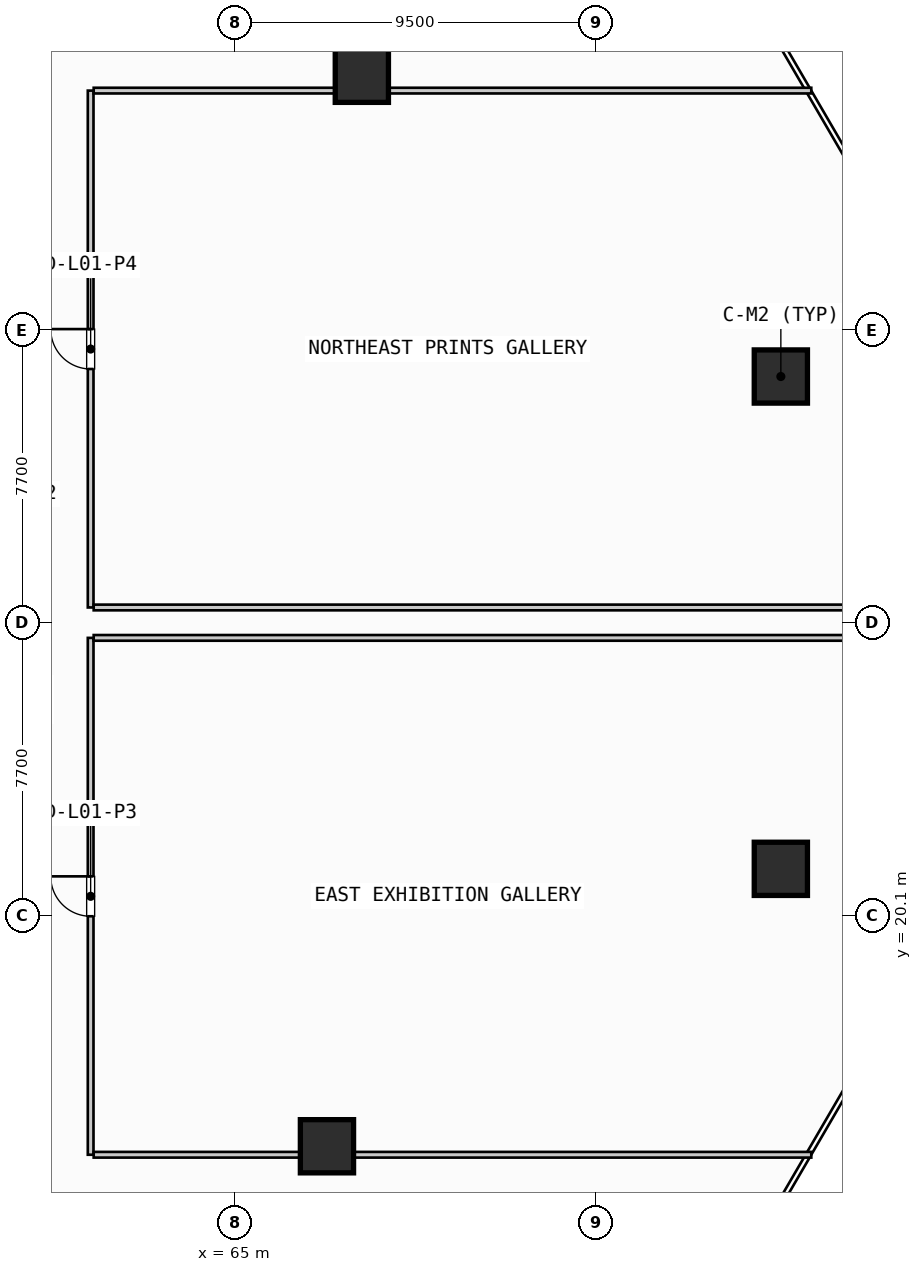
"""IFC4 building model, lengths in metres.
Left out: names, types, materials, properties, quantities, classifications, styles, units other than length and angle.
Written with IfcOpenShell. Run it as: python <this file> out.ifc"""

import sys

from ifc_helpers import new_model, si_unit, direction, frame, frame_2d, origin, origin_2d, place, context, subcontext, project, spatial, rectangle, hollow_rectangle, extrude, source, transform, mapped, element, fill, save


model = new_model("IFC4")
c1 = context("Model", 3, precision=1e-05, world=origin(), true_north=direction((0.0, 1.0)))
c2 = subcontext(c1, "Body", "Model", "MODEL_VIEW")
j1 = project(units=[si_unit("LENGTHUNIT", "METRE"), si_unit("PLANEANGLEUNIT", "RADIAN")], contexts=[c1])
p1 = place(None, origin())
s1 = spatial("IfcSite", under=j1, at=p1, CompositionType="ELEMENT")
p2 = place(p1, origin())
s2 = spatial("IfcBuilding", under=s1, at=p2, CompositionType="ELEMENT")
p3 = place(p2, frame((0.0, 0.0, 5.2)))
s3 = spatial("IfcBuildingStorey", under=s2, at=p3, CompositionType="ELEMENT", Elevation=5.2)
m1 = source(origin(), c2, "Body", "SweptSolid", [
    extrude(hollow_rectangle(XDim=1.4, YDim=1.4, WallThickness=0.05, InnerFilletRadius=0.025, OuterFilletRadius=0.075, at=origin_2d()), origin(), (0.0, 0.0, 1.0), 4.55),
])
for number, where, z_axis, x_axis in (
    (1, (79.362, 34.277, 0.0), (0.0, 0.0, 1.0), (1.0, 0.0, 0.0)),
    (2, (68.336, 42.19, 0.0), (0.0, 0.0, 1.0), (1.0, 0.0, 0.0)),
    (3, (67.418, 14.023, 0.0), (0.0, 0.0, 1.0), (1.0, 0.0, 0.0)),
    (4, (79.362, 21.323, 0.0), (0.0, 0.0, 1.0), (1.0, 0.0, 0.0)),
):
    element("IfcColumn", number, at=place(p3, frame(where, z_axis=z_axis, x_axis=x_axis)), inside=s3, PredefinedType="COLUMN", context=c2, shape_type="MappedRepresentation", body=[
        mapped(m1, transform((0.0, 0.0, 0.0), scale=1.0)),
    ])
p4 = place(p3, frame((61.2, 13.8, 0.0), z_axis=(0.0, 0.0, 1.0), x_axis=(0.0, 1.0, 0.0)))
e5 = element("IfcWall", 5, at=p4, inside=s3, PredefinedType="PARTITIONING", context=c2, shape_type="SweptSolid", body=[
    extrude(rectangle(XDim=13.6, YDim=0.15, at=frame_2d((6.8, 0.0))), origin(), (0.0, 0.0, 1.0), 3.763),
])
p5 = place(p4, frame((6.275, 0.0, 0.0)))
e6 = element("IfcOpeningElement", 6, at=p5, cuts=e5, PredefinedType="OPENING", context=c2, shape_type="SweptSolid", body=[
    extrude(rectangle(XDim=1.05, YDim=2.15, at=frame_2d((0.525, 1.075))), frame((0.0, 0.085, 0.0), z_axis=(0.0, -1.0, 0.0), x_axis=(1.0, 0.0, 0.0)), (0.0, 0.0, 1.0), 0.17),
])
p6 = place(p3, frame((61.28, 13.8, 0.0), z_axis=(0.0, 0.0, 1.0), x_axis=(1.0, 0.0, 0.0)))
e7 = element("IfcWall", 7, at=p6, inside=s3, PredefinedType="PARTITIONING", context=c2, shape_type="SweptSolid", body=[
    extrude(rectangle(XDim=18.883, YDim=0.15, at=frame_2d((9.441, 0.0))), origin(), (0.0, 0.0, 1.0), 3.763),
])
p7 = place(p3, frame((61.28, 27.4, 0.0), z_axis=(0.0, 0.0, 1.0), x_axis=(1.0, 0.0, 0.0)))
e8 = element("IfcWall", 8, at=p7, inside=s3, PredefinedType="PARTITIONING", context=c2, shape_type="SweptSolid", body=[
    extrude(rectangle(XDim=21.893, YDim=0.15, at=frame_2d((10.947, 0.0))), origin(), (0.0, 0.0, 1.0), 3.763),
])
p8 = place(p3, frame((61.2, 28.2, 0.0), z_axis=(0.0, 0.0, 1.0), x_axis=(0.0, 1.0, 0.0)))
e9 = element("IfcWall", 9, at=p8, inside=s3, PredefinedType="PARTITIONING", context=c2, shape_type="SweptSolid", body=[
    extrude(rectangle(XDim=13.6, YDim=0.15, at=frame_2d((6.8, 0.0))), origin(), (0.0, 0.0, 1.0), 3.763),
])
p9 = place(p8, frame((6.275, 0.0, 0.0)))
e10 = element("IfcOpeningElement", 10, at=p9, cuts=e9, PredefinedType="OPENING", context=c2, shape_type="SweptSolid", body=[
    extrude(rectangle(XDim=1.05, YDim=2.15, at=frame_2d((0.525, 1.075))), frame((0.0, 0.085, 0.0), z_axis=(0.0, -1.0, 0.0), x_axis=(1.0, 0.0, 0.0)), (0.0, 0.0, 1.0), 0.17),
])
p10 = place(p3, frame((61.28, 28.2, 0.0), z_axis=(0.0, 0.0, 1.0), x_axis=(1.0, 0.0, 0.0)))
e11 = element("IfcWall", 11, at=p10, inside=s3, PredefinedType="PARTITIONING", context=c2, shape_type="SweptSolid", body=[
    extrude(rectangle(XDim=21.893, YDim=0.15, at=frame_2d((10.947, 0.0))), origin(), (0.0, 0.0, 1.0), 3.763),
])
p11 = place(p3, frame((61.28, 41.8, 0.0), z_axis=(0.0, 0.0, 1.0), x_axis=(1.0, 0.0, 0.0)))
e12 = element("IfcWall", 12, at=p11, inside=s3, PredefinedType="PARTITIONING", context=c2, shape_type="SweptSolid", body=[
    extrude(rectangle(XDim=18.883, YDim=0.15, at=frame_2d((9.441, 0.0))), origin(), (0.0, 0.0, 1.0), 3.03),
])
m2 = source(origin(), c2, "Body", "SweptSolid", [
    extrude(rectangle(XDim=1.05, YDim=2.15, at=frame_2d((0.525, 1.075))), frame((0.0, 0.025, 0.0), z_axis=(0.0, -1.0, 0.0), x_axis=(1.0, 0.0, 0.0)), (0.0, 0.0, 1.0), 0.05),
])
p12 = place(p5, origin())
e13 = element("IfcDoor", 13, at=p12, inside=s3, OperationType="SINGLE_SWING_RIGHT", PredefinedType="DOOR", context=c2, shape_type="MappedRepresentation", body=[
    mapped(m2, transform((0.0, 0.0, 0.0), scale=1.0)),
])
fill(e6, e13)
p13 = place(p9, origin())
e14 = element("IfcDoor", 14, at=p13, inside=s3, OperationType="SINGLE_SWING_RIGHT", PredefinedType="DOOR", context=c2, shape_type="MappedRepresentation", body=[
    mapped(m2, transform((0.0, 0.0, 0.0), scale=1.0)),
])
fill(e10, e14)
save(model, sys.argv[1])
